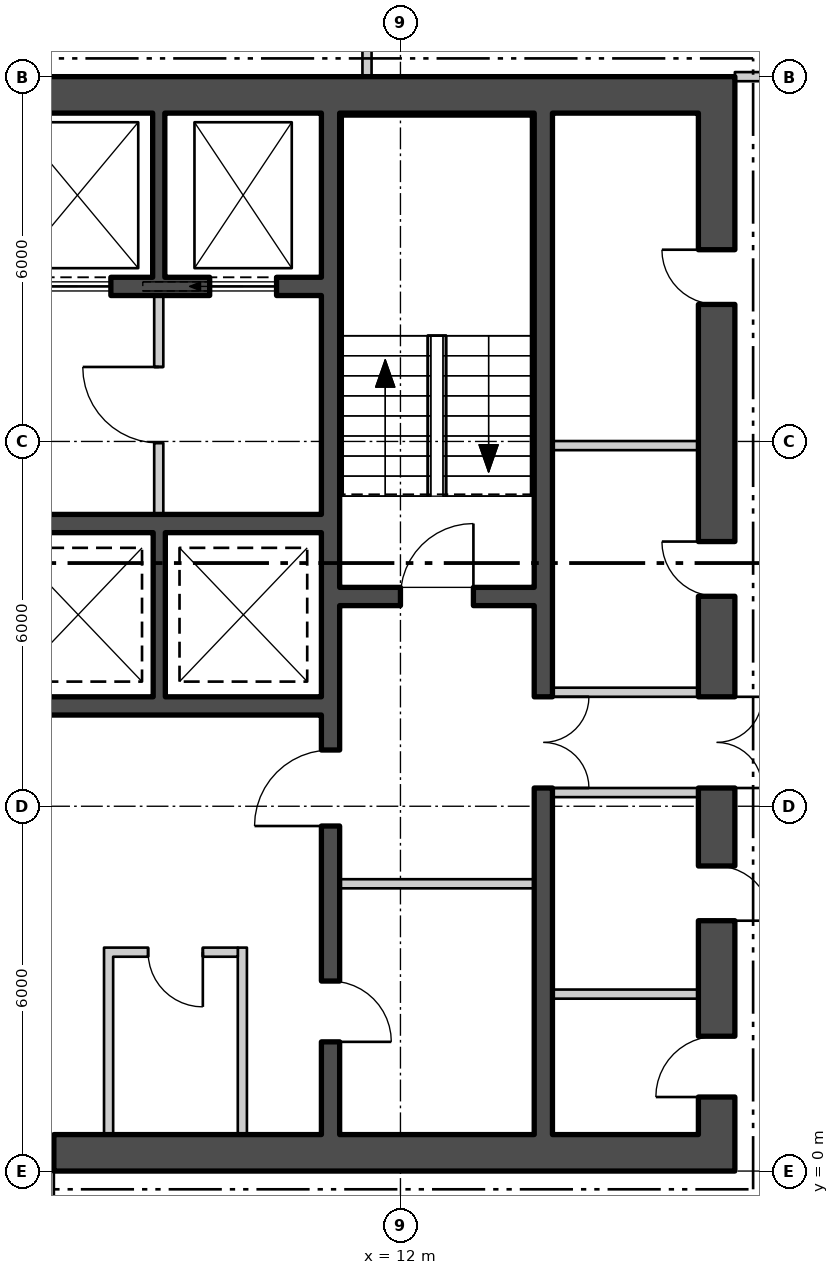
"""IFC4 building model, lengths in metres.
Left out: names, types, materials, properties, quantities, classifications, styles, units other than length and angle.
Written with IfcOpenShell. Run it as: python <this file> out.ifc"""

import sys

from ifc_helpers import new_model, si_unit, direction, frame, frame_2d, origin, place, context, subcontext, project, spatial, rectangle, extrude, element, fill, save


model = new_model("IFC4")
c1 = context("Model", 3, precision=1e-05, world=origin(), true_north=direction((0.0, 1.0)))
c2 = subcontext(c1, "Body", "Model", "MODEL_VIEW")
j1 = project(units=[si_unit("LENGTHUNIT", "METRE"), si_unit("PLANEANGLEUNIT", "RADIAN")], contexts=[c1])
p1 = place(None, origin())
s1 = spatial("IfcSite", under=j1, at=p1, CompositionType="ELEMENT")
p2 = place(p1, origin())
s2 = spatial("IfcBuilding", under=s1, at=p2, CompositionType="ELEMENT")
p3 = place(p2, frame((0.0, 0.0, 8.4)))
s3 = spatial("IfcBuildingStorey", under=s2, at=p3, CompositionType="ELEMENT", Elevation=8.4)
p4 = place(p3, frame((-17.5, 0.3, 0.0), z_axis=(0.0, 0.0, 1.0), x_axis=(1.0, 0.0, 0.0)))
e1 = element("IfcWall", 1, at=p4, inside=s3, PredefinedType="SHEAR", context=c2, shape_type="SweptSolid", body=[
    extrude(rectangle(XDim=35.0, YDim=0.6, at=frame_2d((17.5, 0.0))), origin(), (0.0, 0.0, 1.0), 4.88),
])
p5 = place(p4, frame((12.0, 0.0, 0.0)))
e2 = element("IfcOpeningElement", 2, at=p5, cuts=e1, PredefinedType="OPENING", context=c2, shape_type="SweptSolid", body=[
    extrude(rectangle(XDim=1.8, YDim=2.4, at=frame_2d((0.9, 1.2))), frame((0.0, 0.31, 0.0), z_axis=(0.0, -1.0, 0.0), x_axis=(1.0, 0.0, 0.0)), (0.0, 0.0, 1.0), 0.62),
])
p6 = place(p4, frame((22.0, 0.0, 0.0)))
e3 = element("IfcOpeningElement", 3, at=p6, cuts=e1, PredefinedType="OPENING", context=c2, shape_type="SweptSolid", body=[
    extrude(rectangle(XDim=1.8, YDim=2.4, at=frame_2d((0.9, 1.2))), frame((0.0, 0.31, 0.0), z_axis=(0.0, -1.0, 0.0), x_axis=(1.0, 0.0, 0.0)), (0.0, 0.0, 1.0), 0.62),
])
p7 = place(p3, frame((-17.5, 17.7, 0.0), z_axis=(0.0, 0.0, 1.0), x_axis=(1.0, 0.0, 0.0)))
e4 = element("IfcWall", 4, at=p7, inside=s3, PredefinedType="SHEAR", context=c2, shape_type="SweptSolid", body=[
    extrude(rectangle(XDim=35.0, YDim=0.6, at=frame_2d((17.5, 0.0))), origin(), (0.0, 0.0, 1.0), 4.88),
])
p8 = place(p3, frame((17.2, 0.6, 0.0), z_axis=(0.0, 0.0, 1.0), x_axis=(0.0, 1.0, 0.0)))
e5 = element("IfcWall", 5, at=p8, inside=s3, PredefinedType="SHEAR", context=c2, shape_type="SweptSolid", body=[
    extrude(rectangle(XDim=16.8, YDim=0.6, at=frame_2d((8.4, 0.0))), origin(), (0.0, 0.0, 1.0), 4.88),
])
p9 = place(p8, frame((5.7, 0.0, 0.0)))
e6 = element("IfcOpeningElement", 6, at=p9, cuts=e5, PredefinedType="OPENING", context=c2, shape_type="SweptSolid", body=[
    extrude(rectangle(XDim=1.5, YDim=2.1, at=frame_2d((0.75, 1.05))), frame((0.0, 0.31, 0.0), z_axis=(0.0, -1.0, 0.0), x_axis=(1.0, 0.0, 0.0)), (0.0, 0.0, 1.0), 0.62),
])
p10 = place(p8, frame((0.618, 0.0, 0.0)))
e7 = element("IfcOpeningElement", 7, at=p10, cuts=e5, PredefinedType="OPENING", context=c2, shape_type="SweptSolid", body=[
    extrude(rectangle(XDim=1.0, YDim=2.1, at=frame_2d((0.5, 1.05))), frame((0.0, 0.31, 0.0), z_axis=(0.0, -1.0, 0.0), x_axis=(1.0, 0.0, 0.0)), (0.0, 0.0, 1.0), 0.62),
])
p11 = place(p8, frame((3.518, 0.0, 0.0)))
e8 = element("IfcOpeningElement", 8, at=p11, cuts=e5, PredefinedType="OPENING", context=c2, shape_type="SweptSolid", body=[
    extrude(rectangle(XDim=0.9, YDim=2.1, at=frame_2d((0.45, 1.05))), frame((0.0, 0.31, 0.0), z_axis=(0.0, -1.0, 0.0), x_axis=(1.0, 0.0, 0.0)), (0.0, 0.0, 1.0), 0.62),
])
p12 = place(p8, frame((8.853, 0.0, 0.0)))
e9 = element("IfcOpeningElement", 9, at=p12, cuts=e5, PredefinedType="OPENING", context=c2, shape_type="SweptSolid", body=[
    extrude(rectangle(XDim=0.9, YDim=2.1, at=frame_2d((0.45, 1.05))), frame((0.0, 0.31, 0.0), z_axis=(0.0, -1.0, 0.0), x_axis=(1.0, 0.0, 0.0)), (0.0, 0.0, 1.0), 0.62),
])
p13 = place(p8, frame((13.653, 0.0, 0.0)))
e10 = element("IfcOpeningElement", 10, at=p13, cuts=e5, PredefinedType="OPENING", context=c2, shape_type="SweptSolid", body=[
    extrude(rectangle(XDim=0.9, YDim=2.1, at=frame_2d((0.45, 1.05))), frame((0.0, 0.31, 0.0), z_axis=(0.0, -1.0, 0.0), x_axis=(1.0, 0.0, 0.0)), (0.0, 0.0, 1.0), 0.62),
])
p14 = place(p3, frame((10.85, 0.6, 0.0), z_axis=(0.0, 0.0, 1.0), x_axis=(0.0, 1.0, 0.0)))
e11 = element("IfcWall", 11, at=p14, inside=s3, PredefinedType="SHEAR", context=c2, shape_type="SweptSolid", body=[
    extrude(rectangle(XDim=16.8, YDim=0.3, at=frame_2d((8.4, 0.0))), origin(), (0.0, 0.0, 1.0), 4.88),
])
p15 = place(p14, frame((5.075, 0.0, 0.0)))
e12 = element("IfcOpeningElement", 12, at=p15, cuts=e11, PredefinedType="OPENING", context=c2, shape_type="SweptSolid", body=[
    extrude(rectangle(XDim=1.25, YDim=2.1, at=frame_2d((0.625, 1.05))), frame((0.0, 0.16, 0.0), z_axis=(0.0, -1.0, 0.0), x_axis=(1.0, 0.0, 0.0)), (0.0, 0.0, 1.0), 0.32),
])
p16 = place(p14, frame((1.525, 0.0, 0.0)))
e13 = element("IfcOpeningElement", 13, at=p16, cuts=e11, PredefinedType="OPENING", context=c2, shape_type="SweptSolid", body=[
    extrude(rectangle(XDim=1.0, YDim=2.1, at=frame_2d((0.5, 1.05))), frame((0.0, 0.16, 0.0), z_axis=(0.0, -1.0, 0.0), x_axis=(1.0, 0.0, 0.0)), (0.0, 0.0, 1.0), 0.32),
])
p17 = place(p3, frame((14.35, 0.6, 0.0), z_axis=(0.0, 0.0, 1.0), x_axis=(0.0, 1.0, 0.0)))
e14 = element("IfcWall", 14, at=p17, inside=s3, PredefinedType="SHEAR", context=c2, shape_type="SweptSolid", body=[
    extrude(rectangle(XDim=16.8, YDim=0.3, at=frame_2d((8.4, 0.0))), origin(), (0.0, 0.0, 1.0), 4.88),
])
p18 = place(p17, frame((5.7, 0.0, 0.0)))
e15 = element("IfcOpeningElement", 15, at=p18, cuts=e14, PredefinedType="OPENING", context=c2, shape_type="SweptSolid", body=[
    extrude(rectangle(XDim=1.5, YDim=2.1, at=frame_2d((0.75, 1.05))), frame((0.0, 0.16, 0.0), z_axis=(0.0, -1.0, 0.0), x_axis=(1.0, 0.0, 0.0)), (0.0, 0.0, 1.0), 0.32),
])
p19 = place(p3, frame((11.0, 9.45, 0.0), z_axis=(0.0, 0.0, 1.0), x_axis=(1.0, 0.0, 0.0)))
e16 = element("IfcWall", 16, at=p19, inside=s3, PredefinedType="SHEAR", context=c2, shape_type="SweptSolid", body=[
    extrude(rectangle(XDim=3.2, YDim=0.3, at=frame_2d((1.6, 0.0))), origin(), (0.0, 0.0, 1.0), 4.88),
])
p20 = place(p19, frame((1.0, 0.0, 0.0)))
e17 = element("IfcOpeningElement", 17, at=p20, cuts=e16, PredefinedType="OPENING", context=c2, shape_type="SweptSolid", body=[
    extrude(rectangle(XDim=1.2, YDim=2.1, at=frame_2d((0.6, 1.05))), frame((0.0, 0.16, 0.0), z_axis=(0.0, -1.0, 0.0), x_axis=(1.0, 0.0, 0.0)), (0.0, 0.0, 1.0), 0.32),
])
p21 = place(p3, frame((-10.7, 14.55, 0.0), z_axis=(0.0, 0.0, 1.0), x_axis=(1.0, 0.0, 0.0)))
e18 = element("IfcWall", 18, at=p21, inside=s3, PredefinedType="SHEAR", context=c2, shape_type="SweptSolid", body=[
    extrude(rectangle(XDim=21.4, YDim=0.3, at=frame_2d((10.7, 0.0))), origin(), (0.0, 0.0, 1.0), 4.88),
])
p22 = place(p21, frame((0.738, 0.0, 0.0)))
e19 = element("IfcOpeningElement", 19, at=p22, cuts=e18, PredefinedType="OPENING", context=c2, shape_type="SweptSolid", body=[
    extrude(rectangle(XDim=1.1, YDim=2.1, at=frame_2d((0.55, 1.05))), frame((0.0, 0.16, 0.0), z_axis=(0.0, -1.0, 0.0), x_axis=(1.0, 0.0, 0.0)), (0.0, 0.0, 1.0), 0.32),
])
p23 = place(p21, frame((3.462, 0.0, 0.0)))
e20 = element("IfcOpeningElement", 20, at=p23, cuts=e18, PredefinedType="OPENING", context=c2, shape_type="SweptSolid", body=[
    extrude(rectangle(XDim=1.1, YDim=2.1, at=frame_2d((0.55, 1.05))), frame((0.0, 0.16, 0.0), z_axis=(0.0, -1.0, 0.0), x_axis=(1.0, 0.0, 0.0)), (0.0, 0.0, 1.0), 0.32),
])
p24 = place(p21, frame((6.138, 0.0, 0.0)))
e21 = element("IfcOpeningElement", 21, at=p24, cuts=e18, PredefinedType="OPENING", context=c2, shape_type="SweptSolid", body=[
    extrude(rectangle(XDim=1.1, YDim=2.1, at=frame_2d((0.55, 1.05))), frame((0.0, 0.16, 0.0), z_axis=(0.0, -1.0, 0.0), x_axis=(1.0, 0.0, 0.0)), (0.0, 0.0, 1.0), 0.32),
])
p25 = place(p21, frame((8.812, 0.0, 0.0)))
e22 = element("IfcOpeningElement", 22, at=p25, cuts=e18, PredefinedType="OPENING", context=c2, shape_type="SweptSolid", body=[
    extrude(rectangle(XDim=1.1, YDim=2.1, at=frame_2d((0.55, 1.05))), frame((0.0, 0.16, 0.0), z_axis=(0.0, -1.0, 0.0), x_axis=(1.0, 0.0, 0.0)), (0.0, 0.0, 1.0), 0.32),
])
p26 = place(p21, frame((14.162, 0.0, 0.0)))
e23 = element("IfcOpeningElement", 23, at=p26, cuts=e18, PredefinedType="OPENING", context=c2, shape_type="SweptSolid", body=[
    extrude(rectangle(XDim=1.1, YDim=2.1, at=frame_2d((0.55, 1.05))), frame((0.0, 0.16, 0.0), z_axis=(0.0, -1.0, 0.0), x_axis=(1.0, 0.0, 0.0)), (0.0, 0.0, 1.0), 0.32),
])
p27 = place(p21, frame((16.837, 0.0, 0.0)))
e24 = element("IfcOpeningElement", 24, at=p27, cuts=e18, PredefinedType="OPENING", context=c2, shape_type="SweptSolid", body=[
    extrude(rectangle(XDim=1.1, YDim=2.1, at=frame_2d((0.55, 1.05))), frame((0.0, 0.16, 0.0), z_axis=(0.0, -1.0, 0.0), x_axis=(1.0, 0.0, 0.0)), (0.0, 0.0, 1.0), 0.32),
])
p28 = place(p21, frame((19.562, 0.0, 0.0)))
e25 = element("IfcOpeningElement", 25, at=p28, cuts=e18, PredefinedType="OPENING", context=c2, shape_type="SweptSolid", body=[
    extrude(rectangle(XDim=1.1, YDim=2.1, at=frame_2d((0.55, 1.05))), frame((0.0, 0.16, 0.0), z_axis=(0.0, -1.0, 0.0), x_axis=(1.0, 0.0, 0.0)), (0.0, 0.0, 1.0), 0.32),
])
for number, where, z_axis, x_axis in (
    (26, (2.6, 10.65, 0.0), (0.0, 0.0, 1.0), (1.0, 0.0, 0.0)),
    (27, (2.6, 7.65, 0.0), (0.0, 0.0, 1.0), (1.0, 0.0, 0.0)),
):
    element("IfcWall", number, at=place(p3, frame(where, z_axis=z_axis, x_axis=x_axis)), inside=s3, PredefinedType="SHEAR", context=c2, shape_type="SweptSolid", body=[
        extrude(rectangle(XDim=8.1, YDim=0.3, at=frame_2d((4.05, 0.0))), origin(), (0.0, 0.0, 1.0), 4.88),
    ])
for number, where, z_axis, x_axis in (
    (28, (8.025, 14.7, 0.0), (0.0, 0.0, 1.0), (0.0, 1.0, 0.0)),
    (29, (8.033, 7.8, 0.0), (0.0, 0.0, 1.0), (0.0, 1.0, 0.0)),
):
    element("IfcWall", number, at=place(p3, frame(where, z_axis=z_axis, x_axis=x_axis)), inside=s3, PredefinedType="SHEAR", context=c2, shape_type="SweptSolid", body=[
        extrude(rectangle(XDim=2.7, YDim=0.2, at=frame_2d((1.35, 0.0))), origin(), (0.0, 0.0, 1.0), 4.88),
    ])
p29 = place(p3, frame((8.025, 10.8, 0.0), z_axis=(0.0, 0.0, 1.0), x_axis=(0.0, 1.0, 0.0)))
e30 = element("IfcWall", 30, at=p29, inside=s3, PredefinedType="PARTITIONING", context=c2, shape_type="SweptSolid", body=[
    extrude(rectangle(XDim=3.6, YDim=0.15, at=frame_2d((1.8, 0.0))), origin(), (0.0, 0.0, 1.0), 4.88),
])
p30 = place(p29, frame((1.175, 0.0, 0.0)))
e31 = element("IfcOpeningElement", 31, at=p30, cuts=e30, PredefinedType="OPENING", context=c2, shape_type="SweptSolid", body=[
    extrude(rectangle(XDim=1.25, YDim=2.1, at=frame_2d((0.625, 1.05))), frame((0.0, 0.085, 0.0), z_axis=(0.0, -1.0, 0.0), x_axis=(1.0, 0.0, 0.0)), (0.0, 0.0, 1.0), 0.17),
])
p31 = place(p3, frame((11.0, 4.725, 0.0), z_axis=(0.0, 0.0, 1.0), x_axis=(1.0, 0.0, 0.0)))
e32 = element("IfcWall", 32, at=p31, inside=s3, PredefinedType="PARTITIONING", context=c2, shape_type="SweptSolid", body=[
    extrude(rectangle(XDim=3.2, YDim=0.15, at=frame_2d((1.6, 0.0))), origin(), (0.0, 0.0, 1.0), 4.88),
])
for number, where, z_axis, x_axis in (
    (33, (14.5, 6.225, 0.0), (0.0, 0.0, 1.0), (1.0, 0.0, 0.0)),
    (34, (14.5, 7.875, 0.0), (0.0, 0.0, 1.0), (1.0, 0.0, 0.0)),
    (35, (14.5, 2.91, 0.0), (0.0, 0.0, 1.0), (1.0, 0.0, 0.0)),
    (36, (14.5, 11.932, 0.0), (0.0, 0.0, 1.0), (1.0, 0.0, 0.0)),
):
    element("IfcWall", number, at=place(p3, frame(where, z_axis=z_axis, x_axis=x_axis)), inside=s3, PredefinedType="PARTITIONING", context=c2, shape_type="SweptSolid", body=[
        extrude(rectangle(XDim=2.4, YDim=0.15, at=frame_2d((1.2, 0.0))), origin(), (0.0, 0.0, 1.0), 4.88),
    ])
for number, where, z_axis, x_axis in (
    (37, (7.2, 0.6, 0.0), (0.0, 0.0, 1.0), (0.0, 1.0, 0.0)),
    (38, (9.4, 0.6, 0.0), (0.0, 0.0, 1.0), (0.0, 1.0, 0.0)),
):
    element("IfcWall", number, at=place(p3, frame(where, z_axis=z_axis, x_axis=x_axis)), inside=s3, PredefinedType="PARTITIONING", context=c2, shape_type="SweptSolid", body=[
        extrude(rectangle(XDim=3.075, YDim=0.15, at=frame_2d((1.538, 0.0))), origin(), (0.0, 0.0, 1.0), 4.88),
    ])
p32 = place(p3, frame((7.275, 3.6, 0.0), z_axis=(0.0, 0.0, 1.0), x_axis=(1.0, 0.0, 0.0)))
e39 = element("IfcWall", 39, at=p32, inside=s3, PredefinedType="PARTITIONING", context=c2, shape_type="SweptSolid", body=[
    extrude(rectangle(XDim=2.05, YDim=0.15, at=frame_2d((1.025, 0.0))), origin(), (0.0, 0.0, 1.0), 4.88),
])
p33 = place(p32, frame((0.575, 0.0, 0.0)))
e40 = element("IfcOpeningElement", 40, at=p33, cuts=e39, PredefinedType="OPENING", context=c2, shape_type="SweptSolid", body=[
    extrude(rectangle(XDim=0.9, YDim=2.1, at=frame_2d((0.45, 1.05))), frame((0.0, 0.085, 0.0), z_axis=(0.0, -1.0, 0.0), x_axis=(1.0, 0.0, 0.0)), (0.0, 0.0, 1.0), 0.17),
])
p34 = place(p3, frame((11.45, 18.0, 0.0), z_axis=(0.0, 0.0, 1.0), x_axis=(0.0, 1.0, 0.0)))
e41 = element("IfcWall", 41, at=p34, inside=s3, PredefinedType="PARTITIONING", context=c2, shape_type="SweptSolid", body=[
    extrude(rectangle(XDim=1.75, YDim=0.15, at=frame_2d((0.875, 0.0))), origin(), (0.0, 0.0, 1.0), 4.88),
])
p35 = place(p3, frame((17.5, 18.0, 0.0), z_axis=(0.0, 0.0, 1.0), x_axis=(1.0, 0.0, 0.0)))
e42 = element("IfcWall", 42, at=p35, inside=s3, PredefinedType="PARTITIONING", context=c2, shape_type="SweptSolid", body=[
    extrude(rectangle(XDim=2.475, YDim=0.15, at=frame_2d((1.238, 0.0))), origin(), (0.0, 0.0, 1.0), 4.33),
])
p36 = place(p27, origin())
e43 = element("IfcDoor", 43, at=p36, inside=s3, OperationType="SLIDING_TO_LEFT", PredefinedType="DOOR", context=c2, shape_type="SweptSolid", body=[
    extrude(rectangle(XDim=1.1, YDim=2.1, at=frame_2d((0.55, 1.05))), frame((0.0, 0.025, 0.0), z_axis=(0.0, -1.0, 0.0), x_axis=(1.0, 0.0, 0.0)), (0.0, 0.0, 1.0), 0.05),
])
fill(e24, e43)
p37 = place(p28, origin())
e44 = element("IfcDoor", 44, at=p37, inside=s3, OperationType="SLIDING_TO_LEFT", PredefinedType="DOOR", context=c2, shape_type="SweptSolid", body=[
    extrude(rectangle(XDim=1.1, YDim=2.1, at=frame_2d((0.55, 1.05))), frame((0.0, 0.025, 0.0), z_axis=(0.0, -1.0, 0.0), x_axis=(1.0, 0.0, 0.0)), (0.0, 0.0, 1.0), 0.05),
])
fill(e25, e44)
p38 = place(p30, origin())
e45 = element("IfcDoor", 45, at=p38, inside=s3, OperationType="SINGLE_SWING_LEFT", PredefinedType="DOOR", context=c2, shape_type="SweptSolid", body=[
    extrude(rectangle(XDim=1.25, YDim=2.1, at=frame_2d((0.625, 1.05))), frame((0.0, 0.025, 0.0), z_axis=(0.0, -1.0, 0.0), x_axis=(1.0, 0.0, 0.0)), (0.0, 0.0, 1.0), 0.05),
])
fill(e31, e45)
p39 = place(p20, origin())
e46 = element("IfcDoor", 46, at=p39, inside=s3, OperationType="SINGLE_SWING_LEFT", PredefinedType="DOOR", context=c2, shape_type="SweptSolid", body=[
    extrude(rectangle(XDim=1.2, YDim=2.1, at=frame_2d((0.6, 1.05))), frame((0.0, 0.025, 0.0), z_axis=(0.0, -1.0, 0.0), x_axis=(1.0, 0.0, 0.0)), (0.0, 0.0, 1.0), 0.05),
])
fill(e17, e46)
p40 = place(p15, origin())
e47 = element("IfcDoor", 47, at=p40, inside=s3, OperationType="SINGLE_SWING_RIGHT", PredefinedType="DOOR", context=c2, shape_type="SweptSolid", body=[
    extrude(rectangle(XDim=1.25, YDim=2.1, at=frame_2d((0.625, 1.05))), frame((0.0, 0.025, 0.0), z_axis=(0.0, -1.0, 0.0), x_axis=(1.0, 0.0, 0.0)), (0.0, 0.0, 1.0), 0.05),
])
fill(e12, e47)
p41 = place(p16, origin())
e48 = element("IfcDoor", 48, at=p41, inside=s3, OperationType="SINGLE_SWING_LEFT", PredefinedType="DOOR", context=c2, shape_type="SweptSolid", body=[
    extrude(rectangle(XDim=1.0, YDim=2.1, at=frame_2d((0.5, 1.05))), frame((0.0, 0.025, 0.0), z_axis=(0.0, -1.0, 0.0), x_axis=(1.0, 0.0, 0.0)), (0.0, 0.0, 1.0), 0.05),
])
fill(e13, e48)
p42 = place(p18, origin())
e49 = element("IfcDoor", 49, at=p42, inside=s3, OperationType="DOUBLE_DOOR_SINGLE_SWING", PredefinedType="DOOR", context=c2, shape_type="SweptSolid", body=[
    extrude(rectangle(XDim=1.5, YDim=2.1, at=frame_2d((0.75, 1.05))), frame((0.0, 0.025, 0.0), z_axis=(0.0, -1.0, 0.0), x_axis=(1.0, 0.0, 0.0)), (0.0, 0.0, 1.0), 0.05),
])
fill(e15, e49)
p43 = place(p9, origin())
e50 = element("IfcDoor", 50, at=p43, inside=s3, OperationType="DOUBLE_DOOR_SINGLE_SWING", PredefinedType="DOOR", context=c2, shape_type="SweptSolid", body=[
    extrude(rectangle(XDim=1.5, YDim=2.1, at=frame_2d((0.75, 1.05))), frame((0.0, 0.025, 0.0), z_axis=(0.0, -1.0, 0.0), x_axis=(1.0, 0.0, 0.0)), (0.0, 0.0, 1.0), 0.05),
])
fill(e6, e50)
p44 = place(p10, origin())
e51 = element("IfcDoor", 51, at=p44, inside=s3, OperationType="SINGLE_SWING_RIGHT", PredefinedType="DOOR", context=c2, shape_type="SweptSolid", body=[
    extrude(rectangle(XDim=1.0, YDim=2.1, at=frame_2d((0.5, 1.05))), frame((0.0, 0.025, 0.0), z_axis=(0.0, -1.0, 0.0), x_axis=(1.0, 0.0, 0.0)), (0.0, 0.0, 1.0), 0.05),
])
fill(e7, e51)
p45 = place(p11, origin())
e52 = element("IfcDoor", 52, at=p45, inside=s3, OperationType="SINGLE_SWING_LEFT", PredefinedType="DOOR", context=c2, shape_type="SweptSolid", body=[
    extrude(rectangle(XDim=0.9, YDim=2.1, at=frame_2d((0.45, 1.05))), frame((0.0, 0.025, 0.0), z_axis=(0.0, -1.0, 0.0), x_axis=(1.0, 0.0, 0.0)), (0.0, 0.0, 1.0), 0.05),
])
fill(e8, e52)
p46 = place(p12, origin())
e53 = element("IfcDoor", 53, at=p46, inside=s3, OperationType="SINGLE_SWING_LEFT", PredefinedType="DOOR", context=c2, shape_type="SweptSolid", body=[
    extrude(rectangle(XDim=0.9, YDim=2.1, at=frame_2d((0.45, 1.05))), frame((0.0, 0.025, 0.0), z_axis=(0.0, -1.0, 0.0), x_axis=(1.0, 0.0, 0.0)), (0.0, 0.0, 1.0), 0.05),
])
fill(e9, e53)
p47 = place(p13, origin())
e54 = element("IfcDoor", 54, at=p47, inside=s3, OperationType="SINGLE_SWING_LEFT", PredefinedType="DOOR", context=c2, shape_type="SweptSolid", body=[
    extrude(rectangle(XDim=0.9, YDim=2.1, at=frame_2d((0.45, 1.05))), frame((0.0, 0.025, 0.0), z_axis=(0.0, -1.0, 0.0), x_axis=(1.0, 0.0, 0.0)), (0.0, 0.0, 1.0), 0.05),
])
fill(e10, e54)
p48 = place(p33, origin())
e55 = element("IfcDoor", 55, at=p48, inside=s3, OperationType="SINGLE_SWING_RIGHT", PredefinedType="DOOR", context=c2, shape_type="SweptSolid", body=[
    extrude(rectangle(XDim=0.9, YDim=2.1, at=frame_2d((0.45, 1.05))), frame((0.0, 0.025, 0.0), z_axis=(0.0, -1.0, 0.0), x_axis=(1.0, 0.0, 0.0)), (0.0, 0.0, 1.0), 0.05),
])
fill(e40, e55)
p49 = place(p6, origin())
e56 = element("IfcDoor", 56, at=p49, inside=s3, OperationType="DOUBLE_DOOR_SINGLE_SWING", PredefinedType="DOOR", context=c2, shape_type="SweptSolid", body=[
    extrude(rectangle(XDim=1.8, YDim=2.4, at=frame_2d((0.9, 1.2))), frame((0.0, 0.025, 0.0), z_axis=(0.0, -1.0, 0.0), x_axis=(1.0, 0.0, 0.0)), (0.0, 0.0, 1.0), 0.05),
])
fill(e3, e56)
save(model, sys.argv[1])
